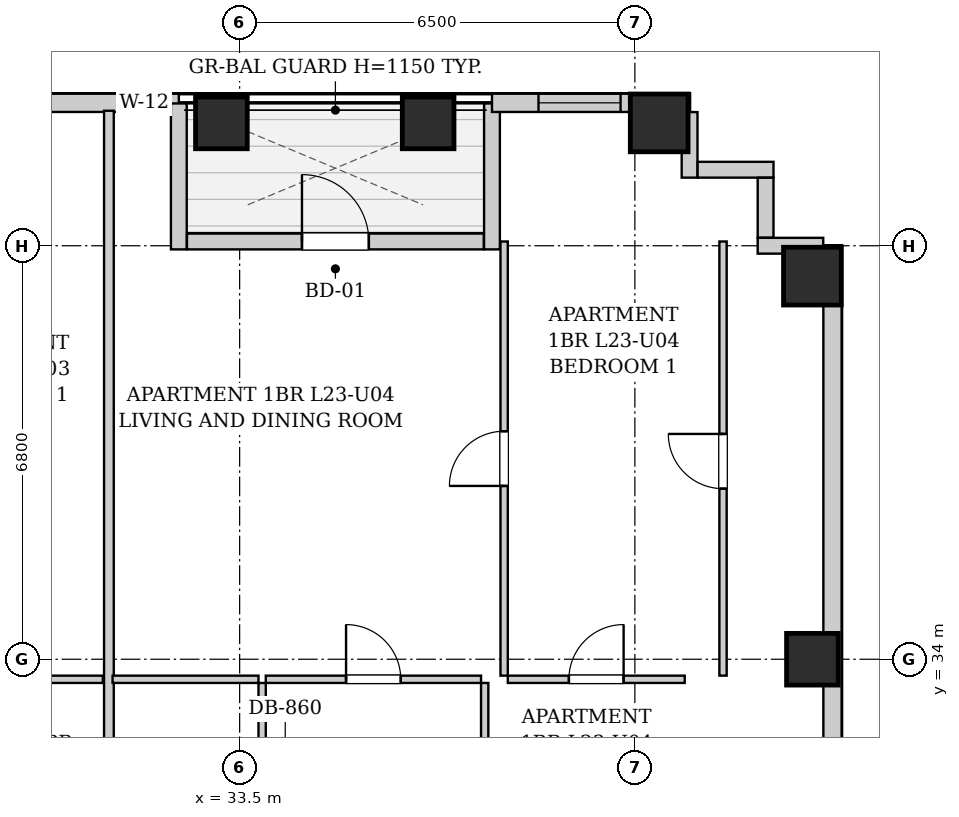
"""IFC4 building model, lengths in metres.
Left out: names, types, materials, properties, quantities, classifications, styles, units other than length and angle.
Written with IfcOpenShell. Run it as: python <this file> out.ifc"""

import sys

from ifc_helpers import new_model, si_unit, direction, frame, frame_2d, origin, origin_2d, place, context, subcontext, project, spatial, rectangle, extrude, element, fill, save


model = new_model("IFC4")
c1 = context("Model", 3, precision=1e-05, world=origin(), true_north=direction((0.0, 1.0)))
c2 = subcontext(c1, "Body", "Model", "MODEL_VIEW")
j1 = project(units=[si_unit("LENGTHUNIT", "METRE"), si_unit("PLANEANGLEUNIT", "RADIAN")], contexts=[c1])
p1 = place(None, origin())
s1 = spatial("IfcSite", under=j1, at=p1, CompositionType="ELEMENT")
p2 = place(p1, origin())
s2 = spatial("IfcBuilding", under=s1, at=p2, CompositionType="ELEMENT")
p3 = place(p2, frame((0.0, 0.0, 84.7)))
s3 = spatial("IfcBuildingStorey", under=s2, at=p3, CompositionType="ELEMENT", Elevation=84.7)
for number, where, z_axis, x_axis in (
    (1, (33.2, 42.82, 0.0), (0.0, 0.0, 1.0), (1.0, 0.0, 0.0)),
    (2, (36.6, 42.82, 0.0), (0.0, 0.0, 1.0), (1.0, 0.0, 0.0)),
):
    element("IfcColumn", number, at=place(p3, frame(where, z_axis=z_axis, x_axis=x_axis)), inside=s3, PredefinedType="COLUMN", context=c2, shape_type="SweptSolid", body=[
        extrude(rectangle(XDim=0.85, YDim=0.85, at=origin_2d()), origin(), (0.0, 0.0, 1.0), 3.2),
    ])
p4 = place(p3, frame((40.4, 42.82, 0.0), z_axis=(0.0, 0.0, 1.0), x_axis=(1.0, 0.0, 0.0)))
e3 = element("IfcColumn", 3, at=p4, inside=s3, PredefinedType="COLUMN", context=c2, shape_type="SweptSolid", body=[
    extrude(rectangle(XDim=0.95, YDim=0.95, at=origin_2d()), origin(), (0.0, 0.0, 1.0), 3.2),
])
p5 = place(p3, frame((42.92, 34.0, 0.0), z_axis=(0.0, 0.0, 1.0), x_axis=(1.0, 0.0, 0.0)))
e4 = element("IfcColumn", 4, at=p5, inside=s3, PredefinedType="COLUMN", context=c2, shape_type="SweptSolid", body=[
    extrude(rectangle(XDim=0.85, YDim=0.85, at=origin_2d()), origin(), (0.0, 0.0, 1.0), 3.2),
])
p6 = place(p3, frame((42.92, 40.3, 0.0), z_axis=(0.0, 0.0, 1.0), x_axis=(1.0, 0.0, 0.0)))
e5 = element("IfcColumn", 5, at=p6, inside=s3, PredefinedType="COLUMN", context=c2, shape_type="SweptSolid", body=[
    extrude(rectangle(XDim=0.95, YDim=0.95, at=origin_2d()), origin(), (0.0, 0.0, 1.0), 3.2),
])
p7 = place(p3, frame((10.0, 43.15, 0.0), z_axis=(0.0, 0.0, 1.0), x_axis=(1.0, 0.0, 0.0)))
e6 = element("IfcWall", 6, at=p7, inside=s3, PredefinedType="SOLIDWALL", context=c2, shape_type="SweptSolid", body=[
    extrude(rectangle(XDim=22.5, YDim=0.3, at=frame_2d((11.25, 0.0))), origin(), (0.0, 0.0, 1.0), 2.94),
])
p8 = place(p7, frame((5.475, 0.0, 0.55)))
e7 = element("IfcOpeningElement", 7, at=p8, cuts=e6, PredefinedType="OPENING", context=c2, shape_type="SweptSolid", body=[
    extrude(rectangle(XDim=1.35, YDim=1.2, at=frame_2d((0.675, 0.6))), frame((0.0, 0.16, 0.0), z_axis=(0.0, -1.0, 0.0), x_axis=(1.0, 0.0, 0.0)), (0.0, 0.0, 1.0), 0.32),
])
p9 = place(p7, frame((9.3, 0.0, 0.55)))
e8 = element("IfcOpeningElement", 8, at=p9, cuts=e6, PredefinedType="OPENING", context=c2, shape_type="SweptSolid", body=[
    extrude(rectangle(XDim=1.35, YDim=1.2, at=frame_2d((0.675, 0.6))), frame((0.0, 0.16, 0.0), z_axis=(0.0, -1.0, 0.0), x_axis=(1.0, 0.0, 0.0)), (0.0, 0.0, 1.0), 0.32),
])
p10 = place(p7, frame((18.975, 0.0, 0.55)))
e9 = element("IfcOpeningElement", 9, at=p10, cuts=e6, PredefinedType="OPENING", context=c2, shape_type="SweptSolid", body=[
    extrude(rectangle(XDim=1.35, YDim=1.2, at=frame_2d((0.675, 0.6))), frame((0.0, 0.16, 0.0), z_axis=(0.0, -1.0, 0.0), x_axis=(1.0, 0.0, 0.0)), (0.0, 0.0, 1.0), 0.32),
])
p11 = place(p7, frame((21.59, 0.0, 0.55)))
e10 = element("IfcOpeningElement", 10, at=p11, cuts=e6, PredefinedType="OPENING", context=c2, shape_type="SweptSolid", body=[
    extrude(rectangle(XDim=0.68, YDim=1.2, at=frame_2d((0.34, 0.6))), frame((0.0, 0.16, 0.0), z_axis=(0.0, -1.0, 0.0), x_axis=(1.0, 0.0, 0.0)), (0.0, 0.0, 1.0), 0.32),
])
p12 = place(p3, frame((32.5, 43.14, 0.0), z_axis=(0.0, 0.0, 1.0), x_axis=(0.0, -1.0, 0.0)))
e11 = element("IfcWall", 11, at=p12, inside=s3, PredefinedType="SOLIDWALL", context=c2, shape_type="SweptSolid", body=[
    extrude(rectangle(XDim=2.4, YDim=0.26, at=frame_2d((1.2, 0.0))), origin(), (0.0, 0.0, 1.0), 2.94),
])
p13 = place(p3, frame((32.634, 40.87, 0.0), z_axis=(0.0, 0.0, 1.0), x_axis=(1.0, 0.0, 0.0)))
e12 = element("IfcWall", 12, at=p13, inside=s3, PredefinedType="SOLIDWALL", context=c2, shape_type="SweptSolid", body=[
    extrude(rectangle(XDim=4.882, YDim=0.26, at=frame_2d((2.441, 0.0))), origin(), (0.0, 0.0, 1.0), 2.94),
])
p14 = place(p13, frame((1.891, 0.0, 0.0)))
e13 = element("IfcOpeningElement", 13, at=p14, cuts=e12, PredefinedType="OPENING", context=c2, shape_type="SweptSolid", body=[
    extrude(rectangle(XDim=1.1, YDim=2.0, at=frame_2d((0.55, 1.0))), frame((0.0, 0.14, 0.0), z_axis=(0.0, -1.0, 0.0), x_axis=(1.0, 0.0, 0.0)), (0.0, 0.0, 1.0), 0.28),
])
p15 = place(p3, frame((37.65, 40.74, 0.0), z_axis=(0.0, 0.0, 1.0), x_axis=(0.0, 1.0, 0.0)))
e14 = element("IfcWall", 14, at=p15, inside=s3, PredefinedType="SOLIDWALL", context=c2, shape_type="SweptSolid", body=[
    extrude(rectangle(XDim=2.4, YDim=0.26, at=frame_2d((1.2, 0.0))), origin(), (0.0, 0.0, 1.0), 2.94),
])
p16 = place(p3, frame((37.65, 43.15, 0.0), z_axis=(0.0, 0.0, 1.0), x_axis=(1.0, 0.0, 0.0)))
e15 = element("IfcWall", 15, at=p16, inside=s3, PredefinedType="SOLIDWALL", context=c2, shape_type="SweptSolid", body=[
    extrude(rectangle(XDim=3.25, YDim=0.3, at=frame_2d((1.625, 0.0))), origin(), (0.0, 0.0, 1.0), 2.94),
])
p17 = place(p16, frame((0.765, 0.0, 0.55)))
e16 = element("IfcOpeningElement", 16, at=p17, cuts=e15, PredefinedType="OPENING", context=c2, shape_type="SweptSolid", body=[
    extrude(rectangle(XDim=1.35, YDim=1.2, at=frame_2d((0.675, 0.6))), frame((0.0, 0.16, 0.0), z_axis=(0.0, -1.0, 0.0), x_axis=(1.0, 0.0, 0.0)), (0.0, 0.0, 1.0), 0.32),
])
p18 = place(p3, frame((43.25, 40.8, 0.0), z_axis=(0.0, 0.0, 1.0), x_axis=(0.0, -1.0, 0.0)))
e17 = element("IfcWall", 17, at=p18, inside=s3, PredefinedType="SOLIDWALL", context=c2, shape_type="SweptSolid", body=[
    extrude(rectangle(XDim=12.6, YDim=0.3, at=frame_2d((6.3, 0.0))), origin(), (0.0, 0.0, 1.0), 2.94),
])
p19 = place(p3, frame((40.9, 42.998, 0.0), z_axis=(0.0, 0.0, 1.0), x_axis=(0.0, -1.0, 0.0)))
e18 = element("IfcWall", 18, at=p19, inside=s3, PredefinedType="SOLIDWALL", context=c2, shape_type="SweptSolid", body=[
    extrude(rectangle(XDim=1.078, YDim=0.26, at=frame_2d((0.539, 0.0))), origin(), (0.0, 0.0, 1.0), 2.94),
])
p20 = place(p3, frame((41.032, 42.05, 0.0), z_axis=(0.0, 0.0, 1.0), x_axis=(1.0, 0.0, 0.0)))
e19 = element("IfcWall", 19, at=p20, inside=s3, PredefinedType="SOLIDWALL", context=c2, shape_type="SweptSolid", body=[
    extrude(rectangle(XDim=1.248, YDim=0.26, at=frame_2d((0.624, 0.0))), origin(), (0.0, 0.0, 1.0), 2.94),
])
p21 = place(p3, frame((42.15, 41.918, 0.0), z_axis=(0.0, 0.0, 1.0), x_axis=(0.0, -1.0, 0.0)))
e20 = element("IfcWall", 20, at=p21, inside=s3, PredefinedType="SOLIDWALL", context=c2, shape_type="SweptSolid", body=[
    extrude(rectangle(XDim=0.986, YDim=0.26, at=frame_2d((0.493, 0.0))), origin(), (0.0, 0.0, 1.0), 2.94),
])
p22 = place(p3, frame((42.02, 40.8, 0.0), z_axis=(0.0, 0.0, 1.0), x_axis=(1.0, 0.0, 0.0)))
e21 = element("IfcWall", 21, at=p22, inside=s3, PredefinedType="SOLIDWALL", context=c2, shape_type="SweptSolid", body=[
    extrude(rectangle(XDim=1.078, YDim=0.26, at=frame_2d((0.539, 0.0))), origin(), (0.0, 0.0, 1.0), 2.94),
])
p23 = place(p3, frame((28.01, 33.67, 0.0), z_axis=(0.0, 0.0, 1.0), x_axis=(1.0, 0.0, 0.0)))
e22 = element("IfcWall", 22, at=p23, inside=s3, PredefinedType="PARTITIONING", context=c2, shape_type="SweptSolid", body=[
    extrude(rectangle(XDim=3.24, YDim=0.12, at=frame_2d((1.62, 0.0))), origin(), (0.0, 0.0, 1.0), 2.94),
])
p24 = place(p23, frame((1.17, 0.0, 0.0)))
e23 = element("IfcOpeningElement", 23, at=p24, cuts=e22, PredefinedType="OPENING", context=c2, shape_type="SweptSolid", body=[
    extrude(rectangle(XDim=0.9, YDim=2.05, at=frame_2d((0.45, 1.025))), frame((0.0, 0.07, 0.0), z_axis=(0.0, -1.0, 0.0), x_axis=(1.0, 0.0, 0.0)), (0.0, 0.0, 1.0), 0.14),
])
p25 = place(p3, frame((31.35, 30.76, 0.0), z_axis=(0.0, 0.0, 1.0), x_axis=(0.0, 1.0, 0.0)))
e24 = element("IfcWall", 24, at=p25, inside=s3, PredefinedType="PARTITIONING", context=c2, shape_type="SweptSolid", body=[
    extrude(rectangle(XDim=12.26, YDim=0.16, at=frame_2d((6.13, 0.0))), origin(), (0.0, 0.0, 1.0), 2.94),
])
p26 = place(p3, frame((33.87, 30.76, 0.0), z_axis=(0.0, 0.0, 1.0), x_axis=(0.0, 1.0, 0.0)))
e25 = element("IfcWall", 25, at=p26, inside=s3, PredefinedType="PARTITIONING", context=c2, shape_type="SweptSolid", body=[
    extrude(rectangle(XDim=2.85, YDim=0.12, at=frame_2d((1.425, 0.0))), origin(), (0.0, 0.0, 1.0), 2.94),
])
p27 = place(p26, frame((0.995, 0.0, 0.0)))
e26 = element("IfcOpeningElement", 26, at=p27, cuts=e25, PredefinedType="OPENING", context=c2, shape_type="SweptSolid", body=[
    extrude(rectangle(XDim=0.86, YDim=2.05, at=frame_2d((0.43, 1.025))), frame((0.0, 0.07, 0.0), z_axis=(0.0, -1.0, 0.0), x_axis=(1.0, 0.0, 0.0)), (0.0, 0.0, 1.0), 0.14),
])
p28 = place(p3, frame((31.41, 33.67, 0.0), z_axis=(0.0, 0.0, 1.0), x_axis=(1.0, 0.0, 0.0)))
e27 = element("IfcWall", 27, at=p28, inside=s3, PredefinedType="PARTITIONING", context=c2, shape_type="SweptSolid", body=[
    extrude(rectangle(XDim=2.4, YDim=0.12, at=frame_2d((1.2, 0.0))), origin(), (0.0, 0.0, 1.0), 2.94),
])
p29 = place(p3, frame((37.53, 30.76, 0.0), z_axis=(0.0, 0.0, 1.0), x_axis=(0.0, 1.0, 0.0)))
e28 = element("IfcWall", 28, at=p29, inside=s3, PredefinedType="PARTITIONING", context=c2, shape_type="SweptSolid", body=[
    extrude(rectangle(XDim=2.85, YDim=0.12, at=frame_2d((1.425, 0.0))), origin(), (0.0, 0.0, 1.0), 2.94),
])
p30 = place(p29, frame((0.975, 0.0, 0.0)))
e29 = element("IfcOpeningElement", 29, at=p30, cuts=e28, PredefinedType="OPENING", context=c2, shape_type="SweptSolid", body=[
    extrude(rectangle(XDim=0.9, YDim=2.05, at=frame_2d((0.45, 1.025))), frame((0.0, 0.07, 0.0), z_axis=(0.0, -1.0, 0.0), x_axis=(1.0, 0.0, 0.0)), (0.0, 0.0, 1.0), 0.14),
])
p31 = place(p3, frame((33.93, 33.67, 0.0), z_axis=(0.0, 0.0, 1.0), x_axis=(1.0, 0.0, 0.0)))
e30 = element("IfcWall", 30, at=p31, inside=s3, PredefinedType="PARTITIONING", context=c2, shape_type="SweptSolid", body=[
    extrude(rectangle(XDim=3.54, YDim=0.12, at=frame_2d((1.77, 0.0))), origin(), (0.0, 0.0, 1.0), 2.94),
])
p32 = place(p31, frame((1.32, 0.0, 0.0)))
e31 = element("IfcOpeningElement", 31, at=p32, cuts=e30, PredefinedType="OPENING", context=c2, shape_type="SweptSolid", body=[
    extrude(rectangle(XDim=0.9, YDim=2.05, at=frame_2d((0.45, 1.025))), frame((0.0, 0.07, 0.0), z_axis=(0.0, -1.0, 0.0), x_axis=(1.0, 0.0, 0.0)), (0.0, 0.0, 1.0), 0.14),
])
p33 = place(p3, frame((37.91, 33.67, 0.0), z_axis=(0.0, 0.0, 1.0), x_axis=(1.0, 0.0, 0.0)))
e32 = element("IfcWall", 32, at=p33, inside=s3, PredefinedType="PARTITIONING", context=c2, shape_type="SweptSolid", body=[
    extrude(rectangle(XDim=2.91, YDim=0.12, at=frame_2d((1.455, 0.0))), origin(), (0.0, 0.0, 1.0), 2.94),
])
p34 = place(p33, frame((1.005, 0.0, 0.0)))
e33 = element("IfcOpeningElement", 33, at=p34, cuts=e32, PredefinedType="OPENING", context=c2, shape_type="SweptSolid", body=[
    extrude(rectangle(XDim=0.9, YDim=2.05, at=frame_2d((0.45, 1.025))), frame((0.0, 0.07, 0.0), z_axis=(0.0, -1.0, 0.0), x_axis=(1.0, 0.0, 0.0)), (0.0, 0.0, 1.0), 0.14),
])
p35 = place(p3, frame((37.85, 33.73, 0.0), z_axis=(0.0, 0.0, 1.0), x_axis=(0.0, 1.0, 0.0)))
e34 = element("IfcWall", 34, at=p35, inside=s3, PredefinedType="PARTITIONING", context=c2, shape_type="SweptSolid", body=[
    extrude(rectangle(XDim=7.14, YDim=0.12, at=frame_2d((3.57, 0.0))), origin(), (0.0, 0.0, 1.0), 2.94),
])
p36 = place(p35, frame((3.12, 0.0, 0.0)))
e35 = element("IfcOpeningElement", 35, at=p36, cuts=e34, PredefinedType="OPENING", context=c2, shape_type="SweptSolid", body=[
    extrude(rectangle(XDim=0.9, YDim=2.05, at=frame_2d((0.45, 1.025))), frame((0.0, 0.07, 0.0), z_axis=(0.0, -1.0, 0.0), x_axis=(1.0, 0.0, 0.0)), (0.0, 0.0, 1.0), 0.14),
])
p37 = place(p3, frame((41.45, 33.73, 0.0), z_axis=(0.0, 0.0, 1.0), x_axis=(0.0, 1.0, 0.0)))
e36 = element("IfcWall", 36, at=p37, inside=s3, PredefinedType="PARTITIONING", context=c2, shape_type="SweptSolid", body=[
    extrude(rectangle(XDim=7.14, YDim=0.12, at=frame_2d((3.57, 0.0))), origin(), (0.0, 0.0, 1.0), 2.94),
])
p38 = place(p37, frame((3.075, 0.0, 0.0)))
e37 = element("IfcOpeningElement", 37, at=p38, cuts=e36, PredefinedType="OPENING", context=c2, shape_type="SweptSolid", body=[
    extrude(rectangle(XDim=0.9, YDim=2.05, at=frame_2d((0.45, 1.025))), frame((0.0, 0.07, 0.0), z_axis=(0.0, -1.0, 0.0), x_axis=(1.0, 0.0, 0.0)), (0.0, 0.0, 1.0), 0.14),
])
p39 = place(p32, origin())
e38 = element("IfcDoor", 38, at=p39, inside=s3, OperationType="SINGLE_SWING_LEFT", PredefinedType="DOOR", context=c2, shape_type="SweptSolid", body=[
    extrude(rectangle(XDim=0.9, YDim=2.05, at=frame_2d((0.45, 1.025))), frame((0.0, 0.025, 0.0), z_axis=(0.0, -1.0, 0.0), x_axis=(1.0, 0.0, 0.0)), (0.0, 0.0, 1.0), 0.05),
])
fill(e31, e38)
p40 = place(p34, origin())
e39 = element("IfcDoor", 39, at=p40, inside=s3, OperationType="SINGLE_SWING_RIGHT", PredefinedType="DOOR", context=c2, shape_type="SweptSolid", body=[
    extrude(rectangle(XDim=0.9, YDim=2.05, at=frame_2d((0.45, 1.025))), frame((0.0, 0.025, 0.0), z_axis=(0.0, -1.0, 0.0), x_axis=(1.0, 0.0, 0.0)), (0.0, 0.0, 1.0), 0.05),
])
fill(e33, e39)
p41 = place(p36, origin())
e40 = element("IfcDoor", 40, at=p41, inside=s3, OperationType="SINGLE_SWING_LEFT", PredefinedType="DOOR", context=c2, shape_type="SweptSolid", body=[
    extrude(rectangle(XDim=0.9, YDim=2.05, at=frame_2d((0.45, 1.025))), frame((0.0, 0.025, 0.0), z_axis=(0.0, -1.0, 0.0), x_axis=(1.0, 0.0, 0.0)), (0.0, 0.0, 1.0), 0.05),
])
fill(e35, e40)
p42 = place(p38, origin())
e41 = element("IfcDoor", 41, at=p42, inside=s3, OperationType="SINGLE_SWING_RIGHT", PredefinedType="DOOR", context=c2, shape_type="SweptSolid", body=[
    extrude(rectangle(XDim=0.9, YDim=2.05, at=frame_2d((0.45, 1.025))), frame((0.0, 0.025, 0.0), z_axis=(0.0, -1.0, 0.0), x_axis=(1.0, 0.0, 0.0)), (0.0, 0.0, 1.0), 0.05),
])
fill(e37, e41)
p43 = place(p14, origin())
e42 = element("IfcDoor", 42, at=p43, inside=s3, OperationType="SINGLE_SWING_LEFT", PredefinedType="DOOR", context=c2, shape_type="SweptSolid", body=[
    extrude(rectangle(XDim=1.1, YDim=2.0, at=frame_2d((0.55, 1.0))), frame((0.0, 0.025, 0.0), z_axis=(0.0, -1.0, 0.0), x_axis=(1.0, 0.0, 0.0)), (0.0, 0.0, 1.0), 0.05),
])
fill(e13, e42)
p44 = place(p11, origin())
e43 = element("IfcWindow", 43, at=p44, inside=s3, PartitioningType="SINGLE_PANEL", PredefinedType="WINDOW", context=c2, shape_type="SweptSolid", body=[
    extrude(rectangle(XDim=0.68, YDim=1.2, at=frame_2d((0.34, 0.6))), frame((0.0, 0.03, 0.0), z_axis=(0.0, -1.0, 0.0), x_axis=(1.0, 0.0, 0.0)), (0.0, 0.0, 1.0), 0.06),
])
fill(e10, e43)
p45 = place(p17, origin())
e44 = element("IfcWindow", 44, at=p45, inside=s3, PartitioningType="SINGLE_PANEL", PredefinedType="WINDOW", context=c2, shape_type="SweptSolid", body=[
    extrude(rectangle(XDim=1.35, YDim=1.2, at=frame_2d((0.675, 0.6))), frame((0.0, 0.03, 0.0), z_axis=(0.0, -1.0, 0.0), x_axis=(1.0, 0.0, 0.0)), (0.0, 0.0, 1.0), 0.06),
])
fill(e16, e44)
save(model, sys.argv[1])
